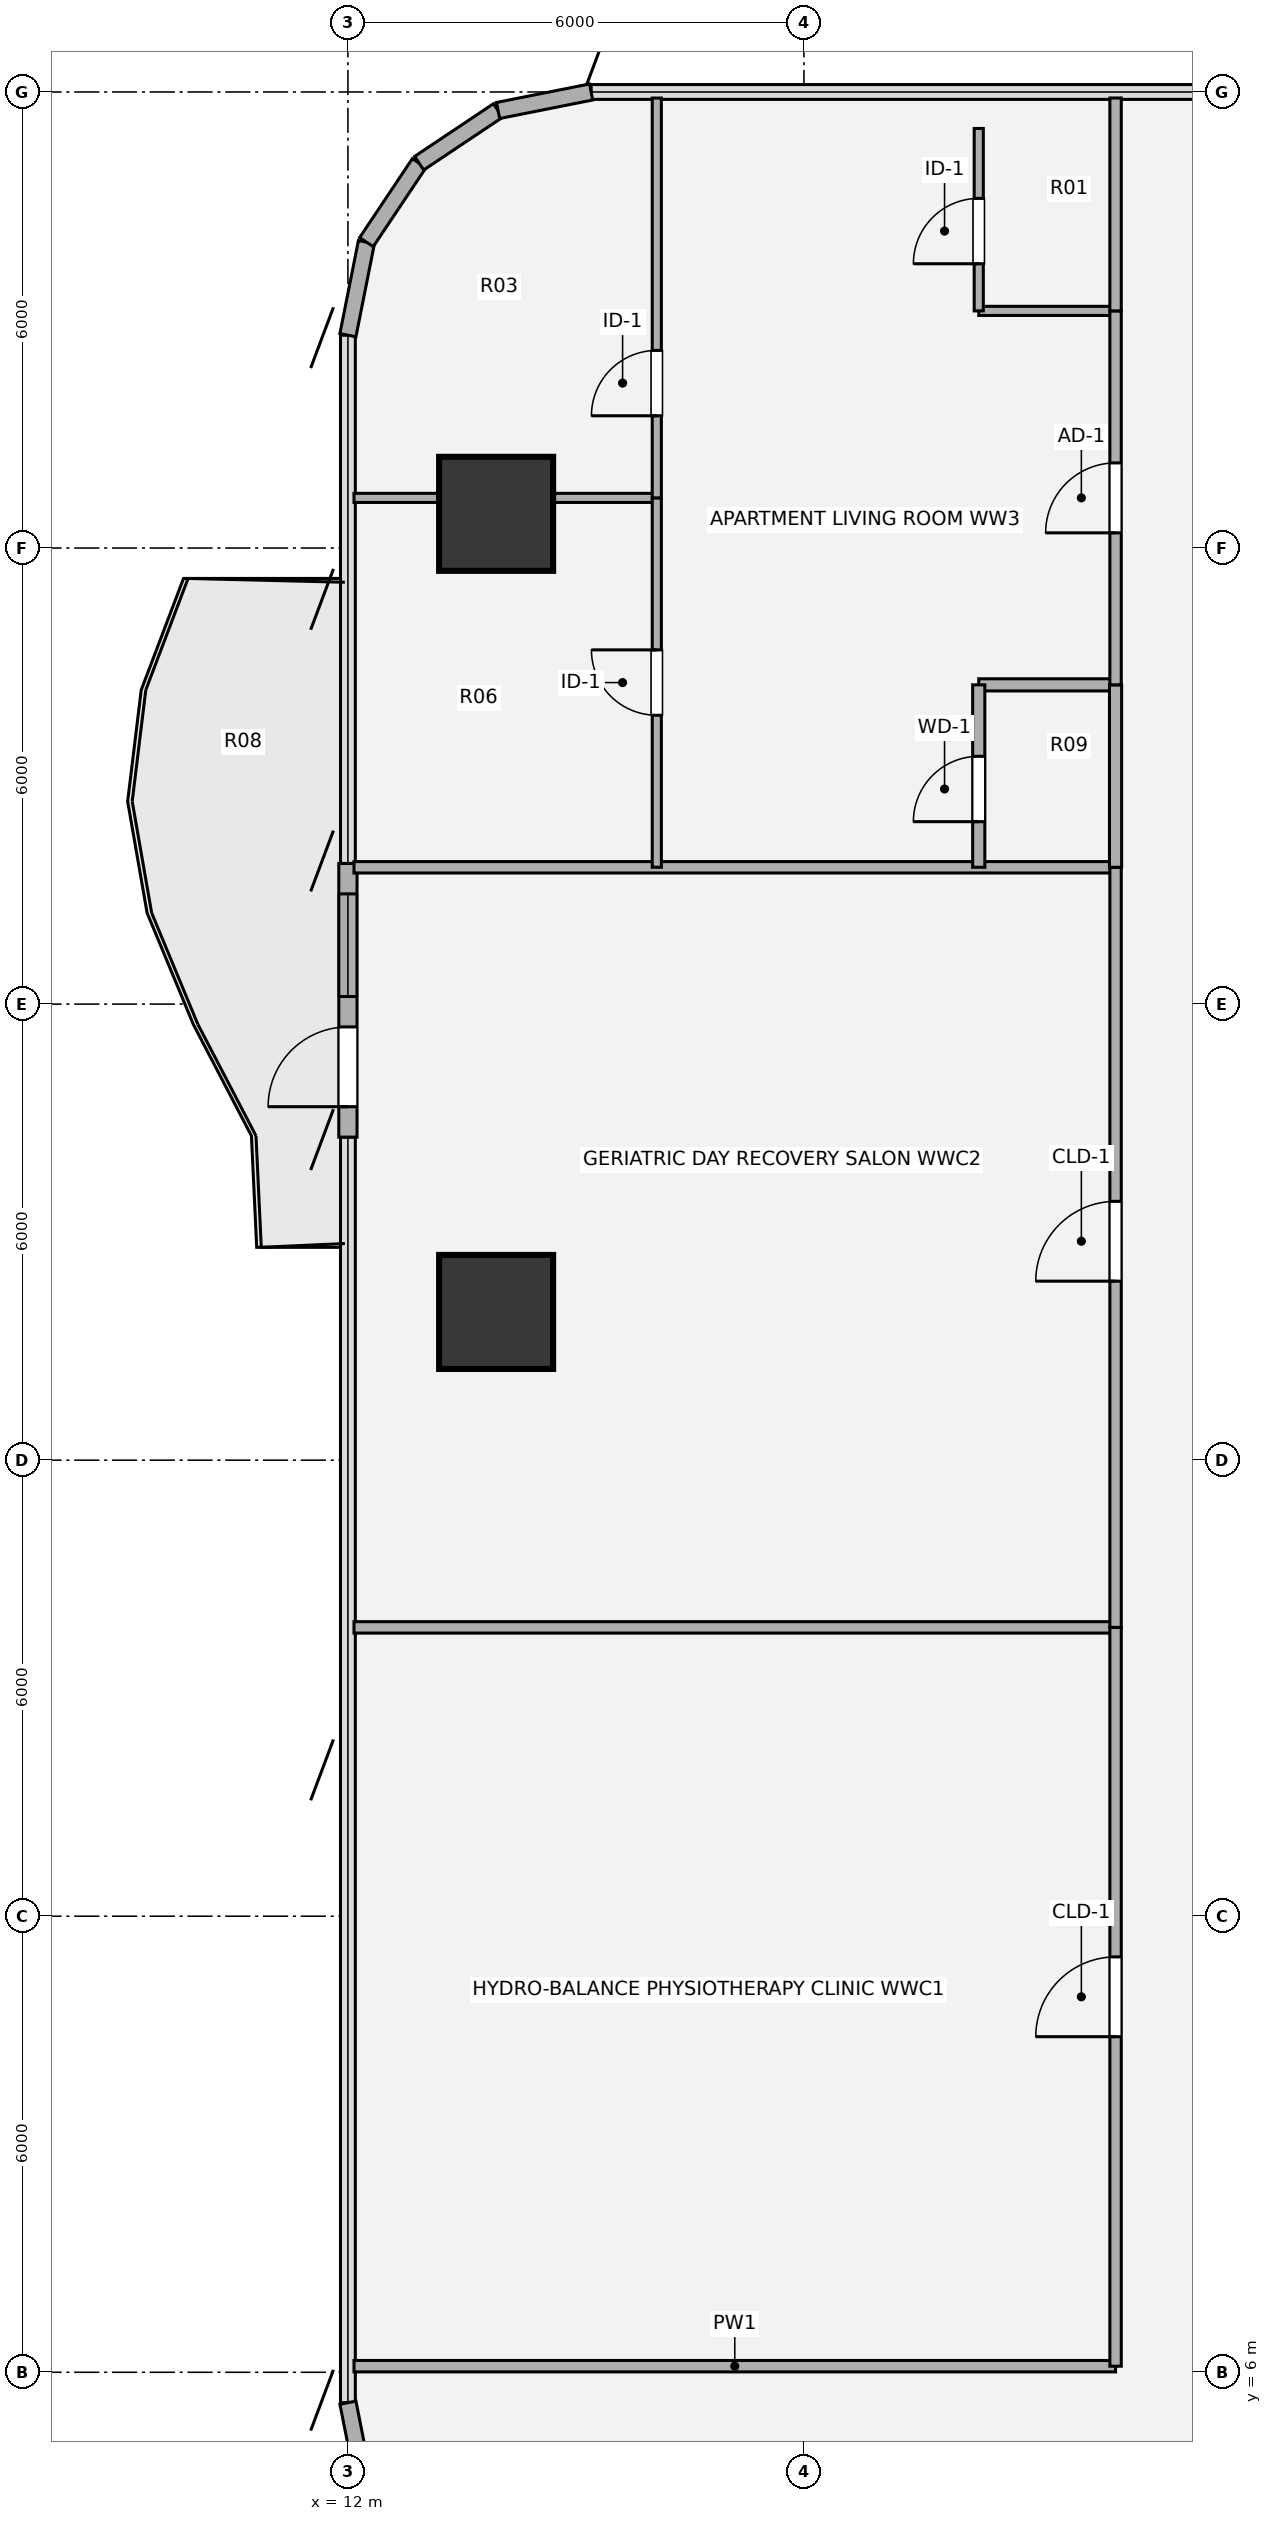
"""IFC4 building model, lengths in metres.
Left out: names, types, materials, properties, quantities, classifications, styles, units other than length and angle.
Written with IfcOpenShell. Run it as: python <this file> out.ifc"""

import sys

from ifc_helpers import new_model, si_unit, direction, frame, frame_2d, origin, origin_2d, place, context, subcontext, project, spatial, rectangle, hollow_circle, extrude, source, transform, mapped, element, fill, save


model = new_model("IFC4")
c1 = context("Model", 3, precision=1e-05, world=origin(), true_north=direction((0.0, 1.0)))
c2 = subcontext(c1, "Body", "Model", "MODEL_VIEW")
j1 = project(units=[si_unit("LENGTHUNIT", "METRE"), si_unit("PLANEANGLEUNIT", "RADIAN")], contexts=[c1])
p1 = place(None, origin())
s1 = spatial("IfcSite", under=j1, at=p1, CompositionType="ELEMENT")
p2 = place(p1, origin())
s2 = spatial("IfcBuilding", under=s1, at=p2, CompositionType="ELEMENT")
p3 = place(p2, frame((0.0, 0.0, 76.14)))
s3 = spatial("IfcBuildingStorey", under=s2, at=p3, CompositionType="ELEMENT", Elevation=76.14)
m1 = source(origin(), c2, "Body", "SweptSolid", [
    extrude(hollow_circle(Radius=0.75, WallThickness=0.05, at=origin_2d()), origin(), (0.0, 0.0, 1.0), 3.372),
])
for number, where, z_axis, x_axis in (
    (1, (13.95, 19.95, 0.0), (0.0, 0.0, 1.0), (1.0, 0.0, 0.0)),
    (2, (13.95, 30.45, 0.0), (0.0, 0.0, 1.0), (1.0, 0.0, 0.0)),
):
    element("IfcColumn", number, at=place(p3, frame(where, z_axis=z_axis, x_axis=x_axis)), inside=s3, PredefinedType="COLUMN", context=c2, shape_type="MappedRepresentation", body=[
        mapped(m1, transform((0.0, 0.0, 0.0), x_axis=(1.0, 0.0, 0.0), y_axis=(0.0, 1.0, 0.0), z_axis=(0.0, 0.0, 1.0), scale=1.0)),
    ])
p4 = place(p3, frame((12.244, 4.375, 0.0), z_axis=(0.0, 0.0, 1.0), x_axis=(-0.195138390419, 0.980775717779, 0.0)))
e3 = element("IfcWall", 3, at=p4, inside=s3, PredefinedType="SOLIDWALL", context=c2, shape_type="SweptSolid", body=[
    extrude(rectangle(XDim=1.249, YDim=0.215, at=frame_2d((0.624, 0.0))), origin(), (0.0, 0.0, 1.0), 3.372),
])
p5 = place(p3, frame((12.0, 22.25, 0.0), z_axis=(0.0, 0.0, 1.0), x_axis=(0.0, 1.0, 0.0)))
e4 = element("IfcWall", 4, at=p5, inside=s3, PredefinedType="SOLIDWALL", context=c2, shape_type="SweptSolid", body=[
    extrude(rectangle(XDim=3.6, YDim=0.24, at=frame_2d((1.8, 0.0))), origin(), (0.0, 0.0, 1.0), 3.372),
])
p6 = place(p5, frame((0.4, 0.0, 0.0)))
e5 = element("IfcOpeningElement", 5, at=p6, cuts=e4, PredefinedType="OPENING", context=c2, shape_type="SweptSolid", body=[
    extrude(rectangle(XDim=1.05, YDim=2.15, at=origin_2d()), frame((0.525, 0.13, 1.075), z_axis=(0.0, -1.0, 0.0), x_axis=(1.0, 0.0, 0.0)), (0.0, 0.0, 1.0), 0.26),
])
p7 = place(p5, frame((1.85, 0.0, 0.85)))
e6 = element("IfcOpeningElement", 6, at=p7, cuts=e4, PredefinedType="OPENING", context=c2, shape_type="SweptSolid", body=[
    extrude(rectangle(XDim=1.35, YDim=1.35, at=origin_2d()), frame((0.675, 0.13, 0.675), z_axis=(0.0, -1.0, 0.0), x_axis=(1.0, 0.0, 0.0)), (0.0, 0.0, 1.0), 0.26),
])
for number, where, z_axis, x_axis in (
    (7, (12.0, 32.8, 0.0), (0.0, 0.0, 1.0), (0.195, 0.981, 0.0)),
    (8, (12.244, 34.025, 0.0), (0.0, 0.0, 1.0), (0.556, 0.831, 0.0)),
    (9, (12.937, 35.063, 0.0), (0.0, 0.0, 1.0), (0.831, 0.556, 0.0)),
    (10, (13.975, 35.756, 0.0), (0.0, 0.0, 1.0), (0.981, 0.195, 0.0)),
):
    element("IfcWall", number, at=place(p3, frame(where, z_axis=z_axis, x_axis=x_axis)), inside=s3, PredefinedType="SOLIDWALL", context=c2, shape_type="SweptSolid", body=[
        extrude(rectangle(XDim=1.249, YDim=0.215, at=frame_2d((0.624, 0.0))), origin(), (0.0, 0.0, 1.0), 3.372),
    ])
for number, where, z_axis, x_axis in (
    (11, (12.08, 6.08, 0.0), (0.0, 0.0, 1.0), (1.0, 0.0, 0.0)),
    (12, (12.08, 15.8, 0.0), (0.0, 0.0, 1.0), (1.0, 0.0, 0.0)),
):
    element("IfcWall", number, at=place(p3, frame(where, z_axis=z_axis, x_axis=x_axis)), inside=s3, PredefinedType="PARTITIONING", context=c2, shape_type="SweptSolid", body=[
        extrude(rectangle(XDim=10.02, YDim=0.15, at=frame_2d((5.01, 0.0))), origin(), (0.0, 0.0, 1.0), 3.342),
    ])
p8 = place(p3, frame((12.08, 25.8, 0.0), z_axis=(0.0, 0.0, 1.0), x_axis=(1.0, 0.0, 0.0)))
e13 = element("IfcWall", 13, at=p8, inside=s3, PredefinedType="PARTITIONING", context=c2, shape_type="SweptSolid", body=[
    extrude(rectangle(XDim=10.02, YDim=0.15, at=frame_2d((5.01, 0.0))), origin(), (0.0, 0.0, 1.0), 2.824),
])
p9 = place(p3, frame((20.3, 28.2, 0.0), z_axis=(0.0, 0.0, 1.0), x_axis=(1.0, 0.0, 0.0)))
e14 = element("IfcWall", 14, at=p9, inside=s3, PredefinedType="PLUMBINGWALL", context=c2, shape_type="SweptSolid", body=[
    extrude(rectangle(XDim=1.8, YDim=0.16, at=frame_2d((0.9, 0.0))), origin(), (0.0, 0.0, 1.0), 2.824),
])
p10 = place(p3, frame((12.08, 30.66, 0.0), z_axis=(0.0, 0.0, 1.0), x_axis=(1.0, 0.0, 0.0)))
e15 = element("IfcWall", 15, at=p10, inside=s3, PredefinedType="PARTITIONING", context=c2, shape_type="SweptSolid", body=[
    extrude(rectangle(XDim=3.984, YDim=0.12, at=frame_2d((1.992, 0.0))), origin(), (0.0, 0.0, 1.0), 1.857),
])
p11 = place(p3, frame((20.3, 33.12, 0.0), z_axis=(0.0, 0.0, 1.0), x_axis=(1.0, 0.0, 0.0)))
e16 = element("IfcWall", 16, at=p11, inside=s3, PredefinedType="PARTITIONING", context=c2, shape_type="SweptSolid", body=[
    extrude(rectangle(XDim=1.8, YDim=0.12, at=frame_2d((0.9, 0.0))), origin(), (0.0, 0.0, 1.0), 1.857),
])
p12 = place(p3, frame((16.064, 25.8, 0.0), z_axis=(0.0, 0.0, 1.0), x_axis=(0.0, 1.0, 0.0)))
e17 = element("IfcWall", 17, at=p12, inside=s3, PredefinedType="PARTITIONING", context=c2, shape_type="SweptSolid", body=[
    extrude(rectangle(XDim=4.86, YDim=0.12, at=frame_2d((2.43, 0.0))), origin(), (0.0, 0.0, 1.0), 3.342),
])
p13 = place(p12, frame((2.0, 0.0, 0.0)))
e18 = element("IfcOpeningElement", 18, at=p13, cuts=e17, PredefinedType="OPENING", context=c2, shape_type="SweptSolid", body=[
    extrude(rectangle(XDim=0.86, YDim=2.1, at=origin_2d()), frame((0.43, 0.07, 1.05), z_axis=(0.0, -1.0, 0.0), x_axis=(1.0, 0.0, 0.0)), (0.0, 0.0, 1.0), 0.14),
])
p14 = place(p3, frame((16.064, 30.66, 0.0), z_axis=(0.0, 0.0, 1.0), x_axis=(0.0, 1.0, 0.0)))
e19 = element("IfcWall", 19, at=p14, inside=s3, PredefinedType="PARTITIONING", context=c2, shape_type="SweptSolid", body=[
    extrude(rectangle(XDim=5.26, YDim=0.12, at=frame_2d((2.63, 0.0))), origin(), (0.0, 0.0, 1.0), 3.342),
])
p15 = place(p14, frame((1.08, 0.0, 0.0)))
e20 = element("IfcOpeningElement", 20, at=p15, cuts=e19, PredefinedType="OPENING", context=c2, shape_type="SweptSolid", body=[
    extrude(rectangle(XDim=0.86, YDim=2.1, at=origin_2d()), frame((0.43, 0.07, 1.05), z_axis=(0.0, -1.0, 0.0), x_axis=(1.0, 0.0, 0.0)), (0.0, 0.0, 1.0), 0.14),
])
p16 = place(p3, frame((20.3, 25.8, 0.0), z_axis=(0.0, 0.0, 1.0), x_axis=(0.0, 1.0, 0.0)))
e21 = element("IfcWall", 21, at=p16, inside=s3, PredefinedType="PLUMBINGWALL", context=c2, shape_type="SweptSolid", body=[
    extrude(rectangle(XDim=2.4, YDim=0.16, at=frame_2d((1.2, 0.0))), origin(), (0.0, 0.0, 1.0), 3.342),
])
p17 = place(p16, frame((0.6, 0.0, 0.0)))
e22 = element("IfcOpeningElement", 22, at=p17, cuts=e21, PredefinedType="OPENING", context=c2, shape_type="SweptSolid", body=[
    extrude(rectangle(XDim=0.86, YDim=2.1, at=origin_2d()), frame((0.43, 0.09, 1.05), z_axis=(0.0, -1.0, 0.0), x_axis=(1.0, 0.0, 0.0)), (0.0, 0.0, 1.0), 0.18),
])
p18 = place(p3, frame((20.3, 33.12, 0.0), z_axis=(0.0, 0.0, 1.0), x_axis=(0.0, 1.0, 0.0)))
e23 = element("IfcWall", 23, at=p18, inside=s3, PredefinedType="PARTITIONING", context=c2, shape_type="SweptSolid", body=[
    extrude(rectangle(XDim=2.4, YDim=0.12, at=frame_2d((1.2, 0.0))), origin(), (0.0, 0.0, 1.0), 3.342),
])
p19 = place(p18, frame((0.62, 0.0, 0.0)))
e24 = element("IfcOpeningElement", 24, at=p19, cuts=e23, PredefinedType="OPENING", context=c2, shape_type="SweptSolid", body=[
    extrude(rectangle(XDim=0.86, YDim=2.1, at=origin_2d()), frame((0.43, 0.07, 1.05), z_axis=(0.0, -1.0, 0.0), x_axis=(1.0, 0.0, 0.0)), (0.0, 0.0, 1.0), 0.14),
])
p20 = place(p3, frame((22.1, 6.08, 0.0), z_axis=(0.0, 0.0, 1.0), x_axis=(0.0, 1.0, 0.0)))
e25 = element("IfcWall", 25, at=p20, inside=s3, PredefinedType="PARTITIONING", context=c2, shape_type="SweptSolid", body=[
    extrude(rectangle(XDim=9.72, YDim=0.15, at=frame_2d((4.86, 0.0))), origin(), (0.0, 0.0, 1.0), 3.342),
])
p21 = place(p20, frame((4.335, 0.0, 0.0)))
e26 = element("IfcOpeningElement", 26, at=p21, cuts=e25, PredefinedType="OPENING", context=c2, shape_type="SweptSolid", body=[
    extrude(rectangle(XDim=1.05, YDim=2.1, at=origin_2d()), frame((0.525, 0.085, 1.05), z_axis=(0.0, -1.0, 0.0), x_axis=(1.0, 0.0, 0.0)), (0.0, 0.0, 1.0), 0.17),
])
p22 = place(p3, frame((22.1, 15.8, 0.0), z_axis=(0.0, 0.0, 1.0), x_axis=(0.0, 1.0, 0.0)))
e27 = element("IfcWall", 27, at=p22, inside=s3, PredefinedType="PARTITIONING", context=c2, shape_type="SweptSolid", body=[
    extrude(rectangle(XDim=10.0, YDim=0.15, at=frame_2d((5.0, 0.0))), origin(), (0.0, 0.0, 1.0), 3.342),
])
p23 = place(p22, frame((4.555, 0.0, 0.0)))
e28 = element("IfcOpeningElement", 28, at=p23, cuts=e27, PredefinedType="OPENING", context=c2, shape_type="SweptSolid", body=[
    extrude(rectangle(XDim=1.05, YDim=2.1, at=origin_2d()), frame((0.525, 0.085, 1.05), z_axis=(0.0, -1.0, 0.0), x_axis=(1.0, 0.0, 0.0)), (0.0, 0.0, 1.0), 0.17),
])
p24 = place(p3, frame((22.1, 25.8, 0.0), z_axis=(0.0, 0.0, 1.0), x_axis=(0.0, 1.0, 0.0)))
e29 = element("IfcWall", 29, at=p24, inside=s3, PredefinedType="PLUMBINGWALL", context=c2, shape_type="SweptSolid", body=[
    extrude(rectangle(XDim=2.4, YDim=0.16, at=frame_2d((1.2, 0.0))), origin(), (0.0, 0.0, 1.0), 3.342),
])
p25 = place(p3, frame((22.1, 28.2, 0.0), z_axis=(0.0, 0.0, 1.0), x_axis=(0.0, 1.0, 0.0)))
e30 = element("IfcWall", 30, at=p25, inside=s3, PredefinedType="PARTITIONING", context=c2, shape_type="SweptSolid", body=[
    extrude(rectangle(XDim=4.92, YDim=0.15, at=frame_2d((2.46, 0.0))), origin(), (0.0, 0.0, 1.0), 3.342),
])
p26 = place(p25, frame((2.0, 0.0, 0.0)))
e31 = element("IfcOpeningElement", 31, at=p26, cuts=e30, PredefinedType="OPENING", context=c2, shape_type="SweptSolid", body=[
    extrude(rectangle(XDim=0.92, YDim=2.1, at=origin_2d()), frame((0.46, 0.085, 1.05), z_axis=(0.0, -1.0, 0.0), x_axis=(1.0, 0.0, 0.0)), (0.0, 0.0, 1.0), 0.17),
])
p27 = place(p3, frame((22.1, 33.12, 0.0), z_axis=(0.0, 0.0, 1.0), x_axis=(0.0, 1.0, 0.0)))
e32 = element("IfcWall", 32, at=p27, inside=s3, PredefinedType="PARTITIONING", context=c2, shape_type="SweptSolid", body=[
    extrude(rectangle(XDim=2.801, YDim=0.15, at=frame_2d((1.4, 0.0))), origin(), (0.0, 0.0, 1.0), 3.342),
])
m2 = source(origin(), c2, "Body", "SweptSolid", [
    extrude(rectangle(XDim=1.05, YDim=2.15, at=origin_2d()), frame((0.525, 0.025, 1.075), z_axis=(0.0, -1.0, 0.0), x_axis=(1.0, 0.0, 0.0)), (0.0, 0.0, 1.0), 0.05),
])
p28 = place(p6, origin())
e33 = element("IfcDoor", 33, at=p28, inside=s3, OperationType="SINGLE_SWING_LEFT", PredefinedType="DOOR", context=c2, shape_type="MappedRepresentation", body=[
    mapped(m2, transform((0.0, 0.0, 0.0), x_axis=(1.0, 0.0, 0.0), y_axis=(0.0, 1.0, 0.0), z_axis=(0.0, 0.0, 1.0), scale=1.0)),
])
fill(e5, e33)
m3 = source(origin(), c2, "Body", "SweptSolid", [
    extrude(rectangle(XDim=1.35, YDim=1.35, at=origin_2d()), frame((0.675, 0.03, 0.675), z_axis=(0.0, -1.0, 0.0), x_axis=(1.0, 0.0, 0.0)), (0.0, 0.0, 1.0), 0.06),
])
p29 = place(p7, origin())
e34 = element("IfcWindow", 34, at=p29, inside=s3, PartitioningType="SINGLE_PANEL", PredefinedType="WINDOW", context=c2, shape_type="MappedRepresentation", body=[
    mapped(m3, transform((0.0, 0.0, 0.0), x_axis=(1.0, 0.0, 0.0), y_axis=(0.0, 1.0, 0.0), z_axis=(0.0, 0.0, 1.0), scale=1.0)),
])
fill(e6, e34)
m4 = source(origin(), c2, "Body", "SweptSolid", [
    extrude(rectangle(XDim=0.86, YDim=2.1, at=origin_2d()), frame((0.43, 0.025, 1.05), z_axis=(0.0, -1.0, 0.0), x_axis=(1.0, 0.0, 0.0)), (0.0, 0.0, 1.0), 0.05),
])
p30 = place(p13, origin())
e35 = element("IfcDoor", 35, at=p30, inside=s3, OperationType="SINGLE_SWING_RIGHT", PredefinedType="DOOR", context=c2, shape_type="MappedRepresentation", body=[
    mapped(m4, transform((0.0, 0.0, 0.0), x_axis=(1.0, 0.0, 0.0), y_axis=(0.0, 1.0, 0.0), z_axis=(0.0, 0.0, 1.0), scale=1.0)),
])
fill(e18, e35)
p31 = place(p15, origin())
e36 = element("IfcDoor", 36, at=p31, inside=s3, OperationType="SINGLE_SWING_LEFT", PredefinedType="DOOR", context=c2, shape_type="MappedRepresentation", body=[
    mapped(m4, transform((0.0, 0.0, 0.0), x_axis=(1.0, 0.0, 0.0), y_axis=(0.0, 1.0, 0.0), z_axis=(0.0, 0.0, 1.0), scale=1.0)),
])
fill(e20, e36)
m5 = source(origin(), c2, "Body", "SweptSolid", [
    extrude(rectangle(XDim=0.86, YDim=2.1, at=origin_2d()), frame((0.43, 0.025, 1.05), z_axis=(0.0, -1.0, 0.0), x_axis=(1.0, 0.0, 0.0)), (0.0, 0.0, 1.0), 0.05),
])
p32 = place(p17, origin())
e37 = element("IfcDoor", 37, at=p32, inside=s3, OperationType="SINGLE_SWING_LEFT", PredefinedType="DOOR", context=c2, shape_type="MappedRepresentation", body=[
    mapped(m5, transform((0.0, 0.0, 0.0), x_axis=(1.0, 0.0, 0.0), y_axis=(0.0, 1.0, 0.0), z_axis=(0.0, 0.0, 1.0), scale=1.0)),
])
fill(e22, e37)
p33 = place(p19, origin())
e38 = element("IfcDoor", 38, at=p33, inside=s3, OperationType="SINGLE_SWING_LEFT", PredefinedType="DOOR", context=c2, shape_type="MappedRepresentation", body=[
    mapped(m4, transform((0.0, 0.0, 0.0), x_axis=(1.0, 0.0, 0.0), y_axis=(0.0, 1.0, 0.0), z_axis=(0.0, 0.0, 1.0), scale=1.0)),
])
fill(e24, e38)
m6 = source(origin(), c2, "Body", "SweptSolid", [
    extrude(rectangle(XDim=1.05, YDim=2.1, at=origin_2d()), frame((0.525, 0.025, 1.05), z_axis=(0.0, -1.0, 0.0), x_axis=(1.0, 0.0, 0.0)), (0.0, 0.0, 1.0), 0.05),
])
p34 = place(p21, origin())
e39 = element("IfcDoor", 39, at=p34, inside=s3, OperationType="SINGLE_SWING_LEFT", PredefinedType="DOOR", context=c2, shape_type="MappedRepresentation", body=[
    mapped(m6, transform((0.0, 0.0, 0.0), x_axis=(1.0, 0.0, 0.0), y_axis=(0.0, 1.0, 0.0), z_axis=(0.0, 0.0, 1.0), scale=1.0)),
])
fill(e26, e39)
p35 = place(p23, origin())
e40 = element("IfcDoor", 40, at=p35, inside=s3, OperationType="SINGLE_SWING_LEFT", PredefinedType="DOOR", context=c2, shape_type="MappedRepresentation", body=[
    mapped(m6, transform((0.0, 0.0, 0.0), x_axis=(1.0, 0.0, 0.0), y_axis=(0.0, 1.0, 0.0), z_axis=(0.0, 0.0, 1.0), scale=1.0)),
])
fill(e28, e40)
m7 = source(origin(), c2, "Body", "SweptSolid", [
    extrude(rectangle(XDim=0.92, YDim=2.1, at=origin_2d()), frame((0.46, 0.025, 1.05), z_axis=(0.0, -1.0, 0.0), x_axis=(1.0, 0.0, 0.0)), (0.0, 0.0, 1.0), 0.05),
])
p36 = place(p26, origin())
e41 = element("IfcDoor", 41, at=p36, inside=s3, OperationType="SINGLE_SWING_LEFT", PredefinedType="DOOR", context=c2, shape_type="MappedRepresentation", body=[
    mapped(m7, transform((0.0, 0.0, 0.0), x_axis=(1.0, 0.0, 0.0), y_axis=(0.0, 1.0, 0.0), z_axis=(0.0, 0.0, 1.0), scale=1.0)),
])
fill(e31, e41)
save(model, sys.argv[1])
